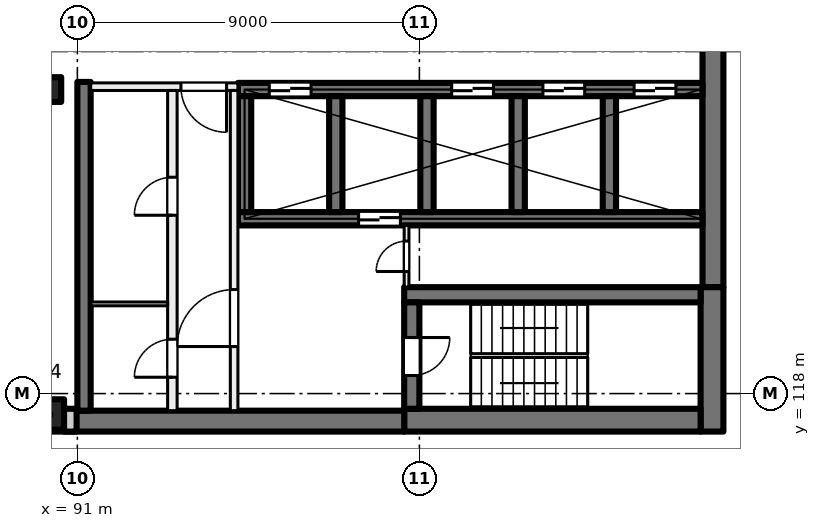
"""IFC4 building model, lengths in metres.
Left out: names, types, materials, properties, quantities, classifications, styles, units other than length and angle.
Written with IfcOpenShell. Run it as: python <this file> out.ifc"""

import sys

from ifc_helpers import new_model, si_unit, direction, frame, frame_2d, origin, origin_2d, place, context, subcontext, project, spatial, rectangle, extrude, element, fill, save


model = new_model("IFC4")
c1 = context("Model", 3, precision=1e-05, world=origin(), true_north=direction((0.0, 1.0)))
c2 = subcontext(c1, "Body", "Model", "MODEL_VIEW")
j1 = project(units=[si_unit("LENGTHUNIT", "METRE"), si_unit("PLANEANGLEUNIT", "RADIAN")], contexts=[c1])
p1 = place(None, origin())
s1 = spatial("IfcSite", under=j1, at=p1, CompositionType="ELEMENT")
p2 = place(p1, origin())
s2 = spatial("IfcBuilding", under=s1, at=p2, CompositionType="ELEMENT")
p3 = place(p2, frame((0.0, 0.0, 170.5)))
s3 = spatial("IfcBuildingStorey", under=s2, at=p3, CompositionType="ELEMENT", Elevation=170.5)
p4 = place(p3, frame((90.25, 126.0, 0.0), z_axis=(0.0, 0.0, 1.0), x_axis=(1.0, 0.0, 0.0)))
e1 = element("IfcColumn", 1, at=p4, inside=s3, PredefinedType="COLUMN", context=c2, shape_type="SweptSolid", body=[
    extrude(rectangle(XDim=0.65, YDim=0.65, at=origin_2d()), origin(), (0.0, 0.0, 1.0), 4.0),
])
p5 = place(p3, frame((90.25, 117.45, 0.0), z_axis=(0.0, 0.0, 1.0), x_axis=(1.0, 0.0, 0.0)))
e2 = element("IfcColumn", 2, at=p5, inside=s3, PredefinedType="COLUMN", context=c2, shape_type="SweptSolid", body=[
    extrude(rectangle(XDim=0.8, YDim=0.8, at=origin_2d()), origin(), (0.0, 0.0, 1.0), 4.0),
])
p6 = place(p3, frame((107.725, 135.2, 0.0), z_axis=(0.0, 0.0, 1.0), x_axis=(0.0, -1.0, 0.0)))
e3 = element("IfcWall", 3, at=p6, inside=s3, PredefinedType="SHEAR", context=c2, shape_type="SweptSolid", body=[
    extrude(rectangle(XDim=14.4, YDim=0.55, at=frame_2d((7.2, 0.0))), origin(), (0.0, 0.0, 1.0), 4.0),
])
p7 = place(p3, frame((107.7, 120.8, 0.0), z_axis=(0.0, 0.0, 1.0), x_axis=(0.0, -1.0, 0.0)))
e4 = element("IfcWall", 4, at=p7, inside=s3, PredefinedType="SHEAR", context=c2, shape_type="SweptSolid", body=[
    extrude(rectangle(XDim=3.8, YDim=0.6, at=frame_2d((1.9, 0.0))), origin(), (0.0, 0.0, 1.0), 4.0),
])
p8 = place(p3, frame((107.4, 117.3, 0.0), z_axis=(0.0, 0.0, 1.0), x_axis=(-1.0, 0.0, 0.0)))
e5 = element("IfcWall", 5, at=p8, inside=s3, PredefinedType="SHEAR", context=c2, shape_type="SweptSolid", body=[
    extrude(rectangle(XDim=7.8, YDim=0.6, at=frame_2d((3.9, 0.0))), origin(), (0.0, 0.0, 1.0), 4.0),
])
p9 = place(p3, frame((99.6, 117.275, 0.0), z_axis=(0.0, 0.0, 1.0), x_axis=(-1.0, 0.0, 0.0)))
e6 = element("IfcWall", 6, at=p9, inside=s3, PredefinedType="SHEAR", context=c2, shape_type="SweptSolid", body=[
    extrude(rectangle(XDim=8.95, YDim=0.55, at=frame_2d((4.475, 0.0))), origin(), (0.0, 0.0, 1.0), 4.0),
])
p10 = place(p3, frame((107.4, 120.6, 0.0), z_axis=(0.0, 0.0, 1.0), x_axis=(-1.0, 0.0, 0.0)))
e7 = element("IfcWall", 7, at=p10, inside=s3, PredefinedType="SHEAR", context=c2, shape_type="SweptSolid", body=[
    extrude(rectangle(XDim=7.8, YDim=0.4, at=frame_2d((3.9, 0.0))), origin(), (0.0, 0.0, 1.0), 4.0),
])
p11 = place(p3, frame((99.8, 120.4, 0.0), z_axis=(0.0, 0.0, 1.0), x_axis=(0.0, -1.0, 0.0)))
e8 = element("IfcWall", 8, at=p11, inside=s3, PredefinedType="SHEAR", context=c2, shape_type="SweptSolid", body=[
    extrude(rectangle(XDim=2.8, YDim=0.4, at=frame_2d((1.4, 0.0))), origin(), (0.0, 0.0, 1.0), 4.0),
])
p12 = place(p11, frame((0.925, 0.0, 0.0)))
e9 = element("IfcOpeningElement", 9, at=p12, cuts=e8, PredefinedType="OPENING", context=c2, shape_type="SweptSolid", body=[
    extrude(rectangle(XDim=1.0, YDim=2.1, at=frame_2d((0.5, 1.05))), frame((0.0, 0.21, 0.0), z_axis=(0.0, -1.0, 0.0), x_axis=(1.0, 0.0, 0.0)), (0.0, 0.0, 1.0), 0.42),
])
p13 = place(p3, frame((107.45, 126.0, 0.0), z_axis=(0.0, 0.0, 1.0), x_axis=(-1.0, 0.0, 0.0)))
e10 = element("IfcWall", 10, at=p13, inside=s3, PredefinedType="SHEAR", context=c2, shape_type="SweptSolid", body=[
    extrude(rectangle(XDim=12.225, YDim=0.35, at=frame_2d((6.112, 0.0))), origin(), (0.0, 0.0, 1.0), 4.0),
])
p14 = place(p13, frame((0.7, 0.0, 0.0)))
e11 = element("IfcOpeningElement", 11, at=p14, cuts=e10, PredefinedType="OPENING", context=c2, shape_type="SweptSolid", body=[
    extrude(rectangle(XDim=1.1, YDim=2.1, at=frame_2d((0.55, 1.05))), frame((0.0, 0.185, 0.0), z_axis=(0.0, -1.0, 0.0), x_axis=(1.0, 0.0, 0.0)), (0.0, 0.0, 1.0), 0.37),
])
p15 = place(p13, frame((3.1, 0.0, 0.0)))
e12 = element("IfcOpeningElement", 12, at=p15, cuts=e10, PredefinedType="OPENING", context=c2, shape_type="SweptSolid", body=[
    extrude(rectangle(XDim=1.1, YDim=2.1, at=frame_2d((0.55, 1.05))), frame((0.0, 0.185, 0.0), z_axis=(0.0, -1.0, 0.0), x_axis=(1.0, 0.0, 0.0)), (0.0, 0.0, 1.0), 0.37),
])
p16 = place(p13, frame((5.5, 0.0, 0.0)))
e13 = element("IfcOpeningElement", 13, at=p16, cuts=e10, PredefinedType="OPENING", context=c2, shape_type="SweptSolid", body=[
    extrude(rectangle(XDim=1.1, YDim=2.1, at=frame_2d((0.55, 1.05))), frame((0.0, 0.185, 0.0), z_axis=(0.0, -1.0, 0.0), x_axis=(1.0, 0.0, 0.0)), (0.0, 0.0, 1.0), 0.37),
])
p17 = place(p13, frame((10.3, 0.0, 0.0)))
e14 = element("IfcOpeningElement", 14, at=p17, cuts=e10, PredefinedType="OPENING", context=c2, shape_type="SweptSolid", body=[
    extrude(rectangle(XDim=1.1, YDim=2.1, at=frame_2d((0.55, 1.05))), frame((0.0, 0.185, 0.0), z_axis=(0.0, -1.0, 0.0), x_axis=(1.0, 0.0, 0.0)), (0.0, 0.0, 1.0), 0.37),
])
p18 = place(p3, frame((107.45, 122.6, 0.0), z_axis=(0.0, 0.0, 1.0), x_axis=(-1.0, 0.0, 0.0)))
e15 = element("IfcWall", 15, at=p18, inside=s3, PredefinedType="SHEAR", context=c2, shape_type="SweptSolid", body=[
    extrude(rectangle(XDim=12.225, YDim=0.35, at=frame_2d((6.112, 0.0))), origin(), (0.0, 0.0, 1.0), 4.0),
])
p19 = place(p18, frame((7.95, 0.0, 0.0)))
e16 = element("IfcOpeningElement", 16, at=p19, cuts=e15, PredefinedType="OPENING", context=c2, shape_type="SweptSolid", body=[
    extrude(rectangle(XDim=1.1, YDim=2.1, at=frame_2d((0.55, 1.05))), frame((0.0, 0.185, 0.0), z_axis=(0.0, -1.0, 0.0), x_axis=(1.0, 0.0, 0.0)), (0.0, 0.0, 1.0), 0.37),
])
for number, where, z_axis, x_axis in (
    (17, (105.0, 125.825, 0.0), (0.0, 0.0, 1.0), (0.0, -1.0, 0.0)),
    (18, (102.6, 125.825, 0.0), (0.0, 0.0, 1.0), (0.0, -1.0, 0.0)),
    (19, (100.2, 125.825, 0.0), (0.0, 0.0, 1.0), (0.0, -1.0, 0.0)),
    (20, (97.8, 125.825, 0.0), (0.0, 0.0, 1.0), (0.0, -1.0, 0.0)),
    (21, (95.4, 125.825, 0.0), (0.0, 0.0, 1.0), (0.0, -1.0, 0.0)),
):
    element("IfcWall", number, at=place(p3, frame(where, z_axis=z_axis, x_axis=x_axis)), inside=s3, PredefinedType="SHEAR", context=c2, shape_type="SweptSolid", body=[
        extrude(rectangle(XDim=3.05, YDim=0.35, at=frame_2d((1.525, 0.0))), origin(), (0.0, 0.0, 1.0), 4.0),
    ])
p20 = place(p3, frame((91.175, 126.2, 0.0), z_axis=(0.0, 0.0, 1.0), x_axis=(0.0, -1.0, 0.0)))
e22 = element("IfcWall", 22, at=p20, inside=s3, PredefinedType="SHEAR", context=c2, shape_type="SweptSolid", body=[
    extrude(rectangle(XDim=8.65, YDim=0.35, at=frame_2d((4.325, 0.0))), origin(), (0.0, 0.0, 1.0), 4.0),
])
p21 = place(p3, frame((90.98, 117.3, 0.0), z_axis=(0.0, 0.0, 1.0), x_axis=(-1.0, 0.0, 0.0)))
e23 = element("IfcWall", 23, at=p21, inside=s3, PredefinedType="SOLIDWALL", context=c2, shape_type="SweptSolid", body=[
    extrude(rectangle(XDim=33.745, YDim=0.6, at=frame_2d((16.873, 0.0))), origin(), (0.0, 0.0, 1.0), 3.625),
])
p22 = place(p21, frame((1.48, 0.0, 0.9)))
e24 = element("IfcOpeningElement", 24, at=p22, cuts=e23, PredefinedType="OPENING", context=c2, shape_type="SweptSolid", body=[
    extrude(rectangle(XDim=3.0, YDim=2.4, at=frame_2d((1.5, 1.2))), frame((0.0, 0.31, 0.0), z_axis=(0.0, -1.0, 0.0), x_axis=(1.0, 0.0, 0.0)), (0.0, 0.0, 1.0), 0.62),
])
p23 = place(p21, frame((5.98, 0.0, 0.9)))
e25 = element("IfcOpeningElement", 25, at=p23, cuts=e23, PredefinedType="OPENING", context=c2, shape_type="SweptSolid", body=[
    extrude(rectangle(XDim=3.0, YDim=2.4, at=frame_2d((1.5, 1.2))), frame((0.0, 0.31, 0.0), z_axis=(0.0, -1.0, 0.0), x_axis=(1.0, 0.0, 0.0)), (0.0, 0.0, 1.0), 0.62),
])
p24 = place(p21, frame((10.48, 0.0, 0.9)))
e26 = element("IfcOpeningElement", 26, at=p24, cuts=e23, PredefinedType="OPENING", context=c2, shape_type="SweptSolid", body=[
    extrude(rectangle(XDim=3.0, YDim=2.4, at=frame_2d((1.5, 1.2))), frame((0.0, 0.31, 0.0), z_axis=(0.0, -1.0, 0.0), x_axis=(1.0, 0.0, 0.0)), (0.0, 0.0, 1.0), 0.62),
])
p25 = place(p21, frame((14.98, 0.0, 0.9)))
e27 = element("IfcOpeningElement", 27, at=p25, cuts=e23, PredefinedType="OPENING", context=c2, shape_type="SweptSolid", body=[
    extrude(rectangle(XDim=3.0, YDim=2.4, at=frame_2d((1.5, 1.2))), frame((0.0, 0.31, 0.0), z_axis=(0.0, -1.0, 0.0), x_axis=(1.0, 0.0, 0.0)), (0.0, 0.0, 1.0), 0.62),
])
p26 = place(p21, frame((19.48, 0.0, 0.9)))
e28 = element("IfcOpeningElement", 28, at=p26, cuts=e23, PredefinedType="OPENING", context=c2, shape_type="SweptSolid", body=[
    extrude(rectangle(XDim=3.0, YDim=2.4, at=frame_2d((1.5, 1.2))), frame((0.0, 0.31, 0.0), z_axis=(0.0, -1.0, 0.0), x_axis=(1.0, 0.0, 0.0)), (0.0, 0.0, 1.0), 0.62),
])
p27 = place(p21, frame((23.98, 0.0, 0.9)))
e29 = element("IfcOpeningElement", 29, at=p27, cuts=e23, PredefinedType="OPENING", context=c2, shape_type="SweptSolid", body=[
    extrude(rectangle(XDim=3.0, YDim=2.4, at=frame_2d((1.5, 1.2))), frame((0.0, 0.31, 0.0), z_axis=(0.0, -1.0, 0.0), x_axis=(1.0, 0.0, 0.0)), (0.0, 0.0, 1.0), 0.62),
])
p28 = place(p21, frame((28.48, 0.0, 0.9)))
e30 = element("IfcOpeningElement", 30, at=p28, cuts=e23, PredefinedType="OPENING", context=c2, shape_type="SweptSolid", body=[
    extrude(rectangle(XDim=3.0, YDim=2.4, at=frame_2d((1.5, 1.2))), frame((0.0, 0.31, 0.0), z_axis=(0.0, -1.0, 0.0), x_axis=(1.0, 0.0, 0.0)), (0.0, 0.0, 1.0), 0.62),
])
p29 = place(p3, frame((95.225, 126.075, 0.0), z_axis=(0.0, 0.0, 1.0), x_axis=(-1.0, 0.0, 0.0)))
e31 = element("IfcWall", 31, at=p29, inside=s3, PredefinedType="PARTITIONING", context=c2, shape_type="SweptSolid", body=[
    extrude(rectangle(XDim=3.875, YDim=0.2, at=frame_2d((1.938, 0.0))), origin(), (0.0, 0.0, 1.0), 3.625),
])
p30 = place(p29, frame((0.3, 0.0, 0.0)))
e32 = element("IfcOpeningElement", 32, at=p30, cuts=e31, PredefinedType="OPENING", context=c2, shape_type="SweptSolid", body=[
    extrude(rectangle(XDim=1.2, YDim=2.1, at=frame_2d((0.6, 1.05))), frame((0.0, 0.11, 0.0), z_axis=(0.0, -1.0, 0.0), x_axis=(1.0, 0.0, 0.0)), (0.0, 0.0, 1.0), 0.22),
])
p31 = place(p3, frame((95.125, 117.55, 0.0), z_axis=(0.0, 0.0, 1.0), x_axis=(0.0, 1.0, 0.0)))
e33 = element("IfcWall", 33, at=p31, inside=s3, PredefinedType="PARTITIONING", context=c2, shape_type="SweptSolid", body=[
    extrude(rectangle(XDim=8.425, YDim=0.2, at=frame_2d((4.212, 0.0))), origin(), (0.0, 0.0, 1.0), 3.625),
])
p32 = place(p31, frame((1.688, 0.0, 0.0)))
e34 = element("IfcOpeningElement", 34, at=p32, cuts=e33, PredefinedType="OPENING", context=c2, shape_type="SweptSolid", body=[
    extrude(rectangle(XDim=1.5, YDim=2.1, at=frame_2d((0.75, 1.05))), frame((0.0, 0.11, 0.0), z_axis=(0.0, -1.0, 0.0), x_axis=(1.0, 0.0, 0.0)), (0.0, 0.0, 1.0), 0.22),
])
p33 = place(p3, frame((93.5, 117.55, 0.0), z_axis=(0.0, 0.0, 1.0), x_axis=(0.0, 1.0, 0.0)))
e35 = element("IfcWall", 35, at=p33, inside=s3, PredefinedType="PARTITIONING", context=c2, shape_type="SweptSolid", body=[
    extrude(rectangle(XDim=8.425, YDim=0.25, at=frame_2d((4.212, 0.0))), origin(), (0.0, 0.0, 1.0), 3.625),
])
p34 = place(p33, frame((5.143, 0.0, 0.0)))
e36 = element("IfcOpeningElement", 36, at=p34, cuts=e35, PredefinedType="OPENING", context=c2, shape_type="SweptSolid", body=[
    extrude(rectangle(XDim=1.0, YDim=2.1, at=frame_2d((0.5, 1.05))), frame((0.0, 0.135, 0.0), z_axis=(0.0, -1.0, 0.0), x_axis=(1.0, 0.0, 0.0)), (0.0, 0.0, 1.0), 0.27),
])
p35 = place(p33, frame((0.88, 0.0, 0.0)))
e37 = element("IfcOpeningElement", 37, at=p35, cuts=e35, PredefinedType="OPENING", context=c2, shape_type="SweptSolid", body=[
    extrude(rectangle(XDim=1.0, YDim=2.1, at=frame_2d((0.5, 1.05))), frame((0.0, 0.135, 0.0), z_axis=(0.0, -1.0, 0.0), x_axis=(1.0, 0.0, 0.0)), (0.0, 0.0, 1.0), 0.27),
])
p36 = place(p3, frame((99.663, 120.8, 0.0), z_axis=(0.0, 0.0, 1.0), x_axis=(0.0, 1.0, 0.0)))
e38 = element("IfcWall", 38, at=p36, inside=s3, PredefinedType="PARTITIONING", context=c2, shape_type="SweptSolid", body=[
    extrude(rectangle(XDim=1.625, YDim=0.125, at=frame_2d((0.812, 0.0))), origin(), (0.0, 0.0, 1.0), 3.625),
])
p37 = place(p36, frame((0.413, 0.0, 0.0)))
e39 = element("IfcOpeningElement", 39, at=p37, cuts=e38, PredefinedType="OPENING", context=c2, shape_type="SweptSolid", body=[
    extrude(rectangle(XDim=0.8, YDim=2.1, at=frame_2d((0.4, 1.05))), frame((0.0, 0.073, 0.0), z_axis=(0.0, -1.0, 0.0), x_axis=(1.0, 0.0, 0.0)), (0.0, 0.0, 1.0), 0.145),
])
p38 = place(p3, frame((93.375, 120.36, 0.0), z_axis=(0.0, 0.0, 1.0), x_axis=(-1.0, 0.0, 0.0)))
e40 = element("IfcWall", 40, at=p38, inside=s3, PredefinedType="PARTITIONING", context=c2, shape_type="SweptSolid", body=[
    extrude(rectangle(XDim=2.025, YDim=0.1, at=frame_2d((1.012, 0.0))), origin(), (0.0, 0.0, 1.0), 3.625),
])
p39 = place(p14, origin())
e41 = element("IfcDoor", 41, at=p39, inside=s3, OperationType="DOUBLE_DOOR_SLIDING", PredefinedType="DOOR", context=c2, shape_type="SweptSolid", body=[
    extrude(rectangle(XDim=1.1, YDim=2.1, at=frame_2d((0.55, 1.05))), frame((0.0, 0.025, 0.0), z_axis=(0.0, -1.0, 0.0), x_axis=(1.0, 0.0, 0.0)), (0.0, 0.0, 1.0), 0.05),
])
fill(e11, e41)
p40 = place(p15, origin())
e42 = element("IfcDoor", 42, at=p40, inside=s3, OperationType="DOUBLE_DOOR_SLIDING", PredefinedType="DOOR", context=c2, shape_type="SweptSolid", body=[
    extrude(rectangle(XDim=1.1, YDim=2.1, at=frame_2d((0.55, 1.05))), frame((0.0, 0.025, 0.0), z_axis=(0.0, -1.0, 0.0), x_axis=(1.0, 0.0, 0.0)), (0.0, 0.0, 1.0), 0.05),
])
fill(e12, e42)
p41 = place(p16, origin())
e43 = element("IfcDoor", 43, at=p41, inside=s3, OperationType="DOUBLE_DOOR_SLIDING", PredefinedType="DOOR", context=c2, shape_type="SweptSolid", body=[
    extrude(rectangle(XDim=1.1, YDim=2.1, at=frame_2d((0.55, 1.05))), frame((0.0, 0.025, 0.0), z_axis=(0.0, -1.0, 0.0), x_axis=(1.0, 0.0, 0.0)), (0.0, 0.0, 1.0), 0.05),
])
fill(e13, e43)
p42 = place(p17, origin())
e44 = element("IfcDoor", 44, at=p42, inside=s3, OperationType="DOUBLE_DOOR_SLIDING", PredefinedType="DOOR", context=c2, shape_type="SweptSolid", body=[
    extrude(rectangle(XDim=1.1, YDim=2.1, at=frame_2d((0.55, 1.05))), frame((0.0, 0.025, 0.0), z_axis=(0.0, -1.0, 0.0), x_axis=(1.0, 0.0, 0.0)), (0.0, 0.0, 1.0), 0.05),
])
fill(e14, e44)
p43 = place(p30, origin())
e45 = element("IfcDoor", 45, at=p43, inside=s3, OperationType="DOUBLE_DOOR_SINGLE_SWING", PredefinedType="DOOR", context=c2, shape_type="SweptSolid", body=[
    extrude(rectangle(XDim=1.2, YDim=2.1, at=frame_2d((0.6, 1.05))), frame((0.0, 0.025, 0.0), z_axis=(0.0, -1.0, 0.0), x_axis=(1.0, 0.0, 0.0)), (0.0, 0.0, 1.0), 0.05),
])
fill(e32, e45)
p44 = place(p32, origin())
e46 = element("IfcDoor", 46, at=p44, inside=s3, OperationType="DOUBLE_DOOR_SINGLE_SWING", PredefinedType="DOOR", context=c2, shape_type="SweptSolid", body=[
    extrude(rectangle(XDim=1.5, YDim=2.1, at=frame_2d((0.75, 1.05))), frame((0.0, 0.025, 0.0), z_axis=(0.0, -1.0, 0.0), x_axis=(1.0, 0.0, 0.0)), (0.0, 0.0, 1.0), 0.05),
])
fill(e34, e46)
p45 = place(p12, origin())
e47 = element("IfcDoor", 47, at=p45, inside=s3, OperationType="SINGLE_SWING_LEFT", PredefinedType="DOOR", context=c2, shape_type="SweptSolid", body=[
    extrude(rectangle(XDim=1.0, YDim=2.1, at=frame_2d((0.5, 1.05))), frame((0.0, 0.025, 0.0), z_axis=(0.0, -1.0, 0.0), x_axis=(1.0, 0.0, 0.0)), (0.0, 0.0, 1.0), 0.05),
])
fill(e9, e47)
p46 = place(p37, origin())
e48 = element("IfcDoor", 48, at=p46, inside=s3, OperationType="SINGLE_SWING_RIGHT", PredefinedType="DOOR", context=c2, shape_type="SweptSolid", body=[
    extrude(rectangle(XDim=0.8, YDim=2.1, at=frame_2d((0.4, 1.05))), frame((0.0, 0.025, 0.0), z_axis=(0.0, -1.0, 0.0), x_axis=(1.0, 0.0, 0.0)), (0.0, 0.0, 1.0), 0.05),
])
fill(e39, e48)
p47 = place(p34, origin())
e49 = element("IfcDoor", 49, at=p47, inside=s3, OperationType="SINGLE_SWING_LEFT", PredefinedType="DOOR", context=c2, shape_type="SweptSolid", body=[
    extrude(rectangle(XDim=1.0, YDim=2.1, at=frame_2d((0.5, 1.05))), frame((0.0, 0.025, 0.0), z_axis=(0.0, -1.0, 0.0), x_axis=(1.0, 0.0, 0.0)), (0.0, 0.0, 1.0), 0.05),
])
fill(e36, e49)
p48 = place(p35, origin())
e50 = element("IfcDoor", 50, at=p48, inside=s3, OperationType="SINGLE_SWING_RIGHT", PredefinedType="DOOR", context=c2, shape_type="SweptSolid", body=[
    extrude(rectangle(XDim=1.0, YDim=2.1, at=frame_2d((0.5, 1.05))), frame((0.0, 0.025, 0.0), z_axis=(0.0, -1.0, 0.0), x_axis=(1.0, 0.0, 0.0)), (0.0, 0.0, 1.0), 0.05),
])
fill(e37, e50)
p49 = place(p19, origin())
e51 = element("IfcDoor", 51, at=p49, inside=s3, OperationType="DOUBLE_DOOR_SLIDING", PredefinedType="DOOR", context=c2, shape_type="SweptSolid", body=[
    extrude(rectangle(XDim=1.1, YDim=2.1, at=frame_2d((0.55, 1.05))), frame((0.0, 0.025, 0.0), z_axis=(0.0, -1.0, 0.0), x_axis=(1.0, 0.0, 0.0)), (0.0, 0.0, 1.0), 0.05),
])
fill(e16, e51)
save(model, sys.argv[1])
